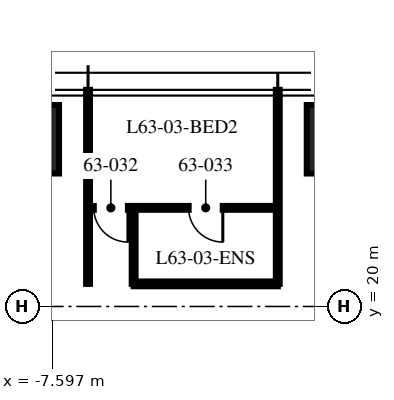
"""IFC4 building model, lengths in metres.
Left out: names, types, materials, properties, quantities, classifications, styles, units other than length and angle.
Written with IfcOpenShell. Run it as: python <this file> out.ifc"""

import sys

from ifc_helpers import new_model, si_unit, direction, frame, frame_2d, origin, origin_2d, place, context, subcontext, project, spatial, rectangle, extrude, element, fill, save


model = new_model("IFC4")
c1 = context("Model", 3, precision=1e-05, world=origin(), true_north=direction((0.0, 1.0)))
c2 = subcontext(c1, "Body", "Model", "MODEL_VIEW")
j1 = project(units=[si_unit("LENGTHUNIT", "METRE"), si_unit("PLANEANGLEUNIT", "RADIAN")], contexts=[c1])
p1 = place(None, origin())
s1 = spatial("IfcSite", under=j1, at=p1, CompositionType="ELEMENT")
p2 = place(p1, origin())
s2 = spatial("IfcBuilding", under=s1, at=p2, CompositionType="ELEMENT")
p3 = place(p2, frame((0.0, 0.0, 252.0)))
s3 = spatial("IfcBuildingStorey", under=s2, at=p3, CompositionType="ELEMENT", Elevation=252.0)
for number, where, z_axis, x_axis in (
    (1, (-8.32, 24.4, 0.0), (0.0, 0.0, 1.0), (1.0, 0.0, 0.0)),
    (2, (0.0, 24.4, 0.0), (0.0, 0.0, 1.0), (1.0, 0.0, 0.0)),
):
    element("IfcColumn", number, at=place(p3, frame(where, z_axis=z_axis, x_axis=x_axis)), inside=s3, PredefinedType="COLUMN", context=c2, shape_type="SweptSolid", body=[
        extrude(rectangle(XDim=1.8, YDim=1.8, at=origin_2d()), origin(), (0.0, 0.0, 1.0), 3.75),
    ])
for number, where, z_axis, x_axis in (
    (3, (-1.664, 20.595, 0.0), (0.0, 0.0, 1.0), (0.0, 1.0, 0.0)),
    (4, (-6.656, 20.595, 0.0), (0.0, 0.0, 1.0), (0.0, 1.0, 0.0)),
):
    element("IfcWall", number, at=place(p3, frame(where, z_axis=z_axis, x_axis=x_axis)), inside=s3, PredefinedType="PARTITIONING", context=c2, shape_type="SweptSolid", body=[
        extrude(rectangle(XDim=5.105, YDim=0.1, at=frame_2d((2.552, 0.0))), origin(), (0.0, 0.0, 1.0), 2.91),
    ])
p4 = place(p3, frame((-1.664, 22.595, 0.0), z_axis=(0.0, 0.0, 1.0), x_axis=(-1.0, 0.0, 0.0)))
e5 = element("IfcWall", 5, at=p4, inside=s3, PredefinedType="PARTITIONING", context=c2, shape_type="SweptSolid", body=[
    extrude(rectangle(XDim=4.992, YDim=0.1, at=frame_2d((2.496, 0.0))), origin(), (0.0, 0.0, 1.0), 2.81),
])
p5 = place(p4, frame((3.942, 0.0, 0.0)))
e6 = element("IfcOpeningElement", 6, at=p5, cuts=e5, PredefinedType="OPENING", context=c2, shape_type="SweptSolid", body=[
    extrude(rectangle(XDim=0.9, YDim=2.1, at=frame_2d((0.45, 1.05))), frame((0.0, 0.06, 0.0), z_axis=(0.0, -1.0, 0.0), x_axis=(1.0, 0.0, 0.0)), (0.0, 0.0, 1.0), 0.12),
])
p6 = place(p4, frame((1.446, 0.0, 0.0)))
e7 = element("IfcOpeningElement", 7, at=p6, cuts=e5, PredefinedType="OPENING", context=c2, shape_type="SweptSolid", body=[
    extrude(rectangle(XDim=0.9, YDim=2.1, at=frame_2d((0.45, 1.05))), frame((0.0, 0.06, 0.0), z_axis=(0.0, -1.0, 0.0), x_axis=(1.0, 0.0, 0.0)), (0.0, 0.0, 1.0), 0.12),
])
p7 = place(p3, frame((-5.456, 20.595, 0.0), z_axis=(0.0, 0.0, 1.0), x_axis=(0.0, 1.0, 0.0)))
e8 = element("IfcWall", 8, at=p7, inside=s3, PredefinedType="PARTITIONING", context=c2, shape_type="SweptSolid", body=[
    extrude(rectangle(XDim=2.0, YDim=0.1, at=frame_2d((1.0, 0.0))), origin(), (0.0, 0.0, 1.0), 3.5),
])
p8 = place(p3, frame((-1.664, 20.595, 0.0), z_axis=(0.0, 0.0, 1.0), x_axis=(-1.0, 0.0, 0.0)))
e9 = element("IfcWall", 9, at=p8, inside=s3, PredefinedType="PARTITIONING", context=c2, shape_type="SweptSolid", body=[
    extrude(rectangle(XDim=3.792, YDim=0.125, at=frame_2d((1.896, 0.0))), origin(), (0.0, 0.0, 1.0), 2.81),
])
p9 = place(p5, origin())
e10 = element("IfcDoor", 10, at=p9, inside=s3, OperationType="SINGLE_SWING_LEFT", PredefinedType="DOOR", context=c2, shape_type="SweptSolid", body=[
    extrude(rectangle(XDim=0.9, YDim=2.1, at=frame_2d((0.45, 1.05))), frame((0.0, 0.025, 0.0), z_axis=(0.0, -1.0, 0.0), x_axis=(1.0, 0.0, 0.0)), (0.0, 0.0, 1.0), 0.05),
])
fill(e6, e10)
p10 = place(p6, origin())
e11 = element("IfcDoor", 11, at=p10, inside=s3, OperationType="SINGLE_SWING_LEFT", PredefinedType="DOOR", context=c2, shape_type="SweptSolid", body=[
    extrude(rectangle(XDim=0.9, YDim=2.1, at=frame_2d((0.45, 1.05))), frame((0.0, 0.025, 0.0), z_axis=(0.0, -1.0, 0.0), x_axis=(1.0, 0.0, 0.0)), (0.0, 0.0, 1.0), 0.05),
])
fill(e7, e11)
save(model, sys.argv[1])
